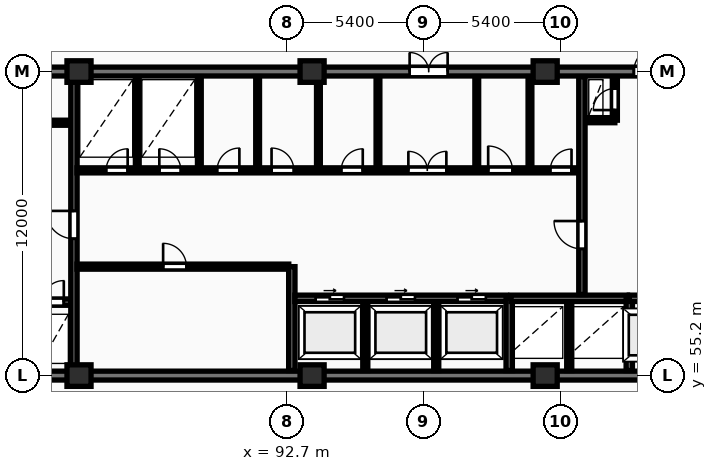
"""IFC4 building model, lengths in metres.
Left out: names, types, materials, properties, quantities, classifications, styles, units other than length and angle.
Written with IfcOpenShell. Run it as: python <this file> out.ifc"""

import sys

from ifc_helpers import new_model, si_unit, direction, frame, frame_2d, origin, origin_2d, place, context, subcontext, project, spatial, rectangle, extrude, element, fill, save


model = new_model("IFC4")
c1 = context("Model", 3, precision=1e-05, world=origin(), true_north=direction((0.0, 1.0)))
c2 = subcontext(c1, "Body", "Model", "MODEL_VIEW")
j1 = project(units=[si_unit("LENGTHUNIT", "METRE"), si_unit("PLANEANGLEUNIT", "RADIAN")], contexts=[c1])
p1 = place(None, origin())
s1 = spatial("IfcSite", under=j1, at=p1, CompositionType="ELEMENT")
p2 = place(p1, origin())
s2 = spatial("IfcBuilding", under=s1, at=p2, CompositionType="ELEMENT")
p3 = place(p2, frame((0.0, 0.0, 119.8)))
s3 = spatial("IfcBuildingStorey", under=s2, at=p3, CompositionType="ELEMENT", Elevation=119.8)
for number, where, z_axis, x_axis in (
    (1, (84.5, 55.2, 0.0), (0.0, 0.0, 1.0), (1.0, 0.0, 0.0)),
    (2, (84.5, 67.2, 0.0), (0.0, 0.0, 1.0), (1.0, 0.0, 0.0)),
    (3, (93.7, 55.2, 0.0), (0.0, 0.0, 1.0), (1.0, 0.0, 0.0)),
    (4, (93.7, 67.2, 0.0), (0.0, 0.0, 1.0), (1.0, 0.0, 0.0)),
    (5, (102.9, 55.2, 0.0), (0.0, 0.0, 1.0), (1.0, 0.0, 0.0)),
    (6, (102.9, 67.2, 0.0), (0.0, 0.0, 1.0), (1.0, 0.0, 0.0)),
):
    element("IfcColumn", number, at=place(p3, frame(where, z_axis=z_axis, x_axis=x_axis)), inside=s3, PredefinedType="COLUMN", context=c2, shape_type="SweptSolid", body=[
        extrude(rectangle(XDim=0.95, YDim=0.85, at=origin_2d()), origin(), (0.0, 0.0, 1.0), 3.25),
    ])
p4 = place(p3, frame((75.95, 55.2, 0.0), z_axis=(0.0, 0.0, 1.0), x_axis=(1.0, 0.0, 0.0)))
e7 = element("IfcWall", 7, at=p4, inside=s3, PredefinedType="SHEAR", context=c2, shape_type="SweptSolid", body=[
    extrude(rectangle(XDim=36.3, YDim=0.35, at=frame_2d((18.15, 0.0))), origin(), (0.0, 0.0, 1.0), 3.25),
])
p5 = place(p3, frame((75.95, 67.2, 0.0), z_axis=(0.0, 0.0, 1.0), x_axis=(1.0, 0.0, 0.0)))
e8 = element("IfcWall", 8, at=p5, inside=s3, PredefinedType="SHEAR", context=c2, shape_type="SweptSolid", body=[
    extrude(rectangle(XDim=36.3, YDim=0.35, at=frame_2d((18.15, 0.0))), origin(), (0.0, 0.0, 1.0), 3.25),
])
p6 = place(p5, frame((5.25, 0.0, 0.0)))
e9 = element("IfcOpeningElement", 9, at=p6, cuts=e8, PredefinedType="OPENING", context=c2, shape_type="SweptSolid", body=[
    extrude(rectangle(XDim=1.0, YDim=2.15, at=frame_2d((0.5, 1.075))), frame((0.0, 0.185, 0.0), z_axis=(0.0, -1.0, 0.0), x_axis=(1.0, 0.0, 0.0)), (0.0, 0.0, 1.0), 0.37),
])
p7 = place(p5, frame((21.6, 0.0, 0.0)))
e10 = element("IfcOpeningElement", 10, at=p7, cuts=e8, PredefinedType="OPENING", context=c2, shape_type="SweptSolid", body=[
    extrude(rectangle(XDim=1.5, YDim=2.2, at=frame_2d((0.75, 1.1))), frame((0.0, 0.185, 0.0), z_axis=(0.0, -1.0, 0.0), x_axis=(1.0, 0.0, 0.0)), (0.0, 0.0, 1.0), 0.37),
])
p8 = place(p5, frame((30.45, 0.0, 0.0)))
e11 = element("IfcOpeningElement", 11, at=p8, cuts=e8, PredefinedType="OPENING", context=c2, shape_type="SweptSolid", body=[
    extrude(rectangle(XDim=1.0, YDim=2.15, at=frame_2d((0.5, 1.075))), frame((0.0, 0.185, 0.0), z_axis=(0.0, -1.0, 0.0), x_axis=(1.0, 0.0, 0.0)), (0.0, 0.0, 1.0), 0.37),
])
p9 = place(p3, frame((79.79, 58.1, 0.0), z_axis=(0.0, 0.0, 1.0), x_axis=(1.0, 0.0, 0.0)))
e12 = element("IfcWall", 12, at=p9, inside=s3, PredefinedType="SHEAR", context=c2, shape_type="SweptSolid", body=[
    extrude(rectangle(XDim=4.39, YDim=0.25, at=frame_2d((2.195, 0.0))), origin(), (0.0, 0.0, 1.0), 3.25),
])
p10 = place(p9, frame((1.05, 0.0, 0.0)))
e13 = element("IfcOpeningElement", 13, at=p10, cuts=e12, PredefinedType="OPENING", context=c2, shape_type="SweptSolid", body=[
    extrude(rectangle(XDim=1.12, YDim=2.12, at=frame_2d((0.56, 1.06))), frame((0.0, 0.135, 0.0), z_axis=(0.0, -1.0, 0.0), x_axis=(1.0, 0.0, 0.0)), (0.0, 0.0, 1.0), 0.27),
])
p11 = place(p9, frame((3.26, 0.0, 0.0)))
e14 = element("IfcOpeningElement", 14, at=p11, cuts=e12, PredefinedType="OPENING", context=c2, shape_type="SweptSolid", body=[
    extrude(rectangle(XDim=0.85, YDim=2.05, at=frame_2d((0.425, 1.025))), frame((0.0, 0.135, 0.0), z_axis=(0.0, -1.0, 0.0), x_axis=(1.0, 0.0, 0.0)), (0.0, 0.0, 1.0), 0.27),
])
p12 = place(p3, frame((79.79, 65.18, 0.0), z_axis=(0.0, 0.0, 1.0), x_axis=(1.0, 0.0, 0.0)))
e15 = element("IfcWall", 15, at=p12, inside=s3, PredefinedType="PARTITIONING", context=c2, shape_type="SweptSolid", body=[
    extrude(rectangle(XDim=4.39, YDim=0.2, at=frame_2d((2.195, 0.0))), origin(), (0.0, 0.0, 1.0), 2.97),
])
p13 = place(p12, frame((1.5, 0.0, 0.0)))
e16 = element("IfcOpeningElement", 16, at=p13, cuts=e15, PredefinedType="OPENING", context=c2, shape_type="SweptSolid", body=[
    extrude(rectangle(XDim=1.1, YDim=2.1, at=frame_2d((0.55, 1.05))), frame((0.0, 0.11, 0.0), z_axis=(0.0, -1.0, 0.0), x_axis=(1.0, 0.0, 0.0)), (0.0, 0.0, 1.0), 0.22),
])
p14 = place(p3, frame((84.3, 55.4, 0.0), z_axis=(0.0, 0.0, 1.0), x_axis=(0.0, 1.0, 0.0)))
e17 = element("IfcWall", 17, at=p14, inside=s3, PredefinedType="SHEAR", context=c2, shape_type="SweptSolid", body=[
    extrude(rectangle(XDim=11.6, YDim=0.25, at=frame_2d((5.8, 0.0))), origin(), (0.0, 0.0, 1.0), 3.25),
])
p15 = place(p14, frame((5.2, 0.0, 0.0)))
e18 = element("IfcOpeningElement", 18, at=p15, cuts=e17, PredefinedType="OPENING", context=c2, shape_type="SweptSolid", body=[
    extrude(rectangle(XDim=1.1, YDim=2.1, at=frame_2d((0.55, 1.05))), frame((0.0, 0.135, 0.0), z_axis=(0.0, -1.0, 0.0), x_axis=(1.0, 0.0, 0.0)), (0.0, 0.0, 1.0), 0.27),
])
p16 = place(p3, frame((84.42, 59.5, 0.0), z_axis=(0.0, 0.0, 1.0), x_axis=(1.0, 0.0, 0.0)))
e19 = element("IfcWall", 19, at=p16, inside=s3, PredefinedType="PARTITIONING", context=c2, shape_type="SweptSolid", body=[
    extrude(rectangle(XDim=8.36, YDim=0.2, at=frame_2d((4.18, 0.0))), origin(), (0.0, 0.0, 1.0), 2.97),
])
p17 = place(p16, frame((3.4, 0.0, 0.0)))
e20 = element("IfcOpeningElement", 20, at=p17, cuts=e19, PredefinedType="OPENING", context=c2, shape_type="SweptSolid", body=[
    extrude(rectangle(XDim=0.92, YDim=2.08, at=frame_2d((0.46, 1.04))), frame((0.0, 0.11, 0.0), z_axis=(0.0, -1.0, 0.0), x_axis=(1.0, 0.0, 0.0)), (0.0, 0.0, 1.0), 0.22),
])
p18 = place(p3, frame((92.9, 55.4, 0.0), z_axis=(0.0, 0.0, 1.0), x_axis=(0.0, 1.0, 0.0)))
e21 = element("IfcWall", 21, at=p18, inside=s3, PredefinedType="SHEAR", context=c2, shape_type="SweptSolid", body=[
    extrude(rectangle(XDim=4.1, YDim=0.25, at=frame_2d((2.05, 0.0))), origin(), (0.0, 0.0, 1.0), 3.25),
])
for number, where, z_axis, x_axis in (
    (22, (95.8, 55.4, 0.0), (0.0, 0.0, 1.0), (0.0, 1.0, 0.0)),
    (23, (98.6, 55.4, 0.0), (0.0, 0.0, 1.0), (0.0, 1.0, 0.0)),
):
    element("IfcWall", number, at=place(p3, frame(where, z_axis=z_axis, x_axis=x_axis)), inside=s3, PredefinedType="PARTITIONING", context=c2, shape_type="SweptSolid", body=[
        extrude(rectangle(XDim=2.72, YDim=0.2, at=frame_2d((1.36, 0.0))), origin(), (0.0, 0.0, 1.0), 2.97),
    ])
p19 = place(p3, frame((93.02, 58.25, 0.0), z_axis=(0.0, 0.0, 1.0), x_axis=(1.0, 0.0, 0.0)))
e24 = element("IfcWall", 24, at=p19, inside=s3, PredefinedType="SHEAR", context=c2, shape_type="SweptSolid", body=[
    extrude(rectangle(XDim=8.36, YDim=0.25, at=frame_2d((4.18, 0.0))), origin(), (0.0, 0.0, 1.0), 3.25),
])
p20 = place(p19, frame((0.82, 0.0, 0.0)))
e25 = element("IfcOpeningElement", 25, at=p20, cuts=e24, PredefinedType="OPENING", context=c2, shape_type="SweptSolid", body=[
    extrude(rectangle(XDim=1.12, YDim=2.12, at=frame_2d((0.56, 1.06))), frame((0.0, 0.135, 0.0), z_axis=(0.0, -1.0, 0.0), x_axis=(1.0, 0.0, 0.0)), (0.0, 0.0, 1.0), 0.27),
])
p21 = place(p19, frame((3.62, 0.0, 0.0)))
e26 = element("IfcOpeningElement", 26, at=p21, cuts=e24, PredefinedType="OPENING", context=c2, shape_type="SweptSolid", body=[
    extrude(rectangle(XDim=1.12, YDim=2.12, at=frame_2d((0.56, 1.06))), frame((0.0, 0.135, 0.0), z_axis=(0.0, -1.0, 0.0), x_axis=(1.0, 0.0, 0.0)), (0.0, 0.0, 1.0), 0.27),
])
p22 = place(p19, frame((6.42, 0.0, 0.0)))
e27 = element("IfcOpeningElement", 27, at=p22, cuts=e24, PredefinedType="OPENING", context=c2, shape_type="SweptSolid", body=[
    extrude(rectangle(XDim=1.12, YDim=2.12, at=frame_2d((0.56, 1.06))), frame((0.0, 0.135, 0.0), z_axis=(0.0, -1.0, 0.0), x_axis=(1.0, 0.0, 0.0)), (0.0, 0.0, 1.0), 0.27),
])
p23 = place(p3, frame((101.48, 55.4, 0.0), z_axis=(0.0, 0.0, 1.0), x_axis=(0.0, 1.0, 0.0)))
e28 = element("IfcWall", 28, at=p23, inside=s3, PredefinedType="SHEAR", context=c2, shape_type="SweptSolid", body=[
    extrude(rectangle(XDim=2.85, YDim=0.25, at=frame_2d((1.425, 0.0))), origin(), (0.0, 0.0, 1.0), 3.25),
])
p24 = place(p3, frame((103.85, 55.4, 0.0), z_axis=(0.0, 0.0, 1.0), x_axis=(0.0, 1.0, 0.0)))
e29 = element("IfcWall", 29, at=p24, inside=s3, PredefinedType="PARTITIONING", context=c2, shape_type="SweptSolid", body=[
    extrude(rectangle(XDim=2.72, YDim=0.2, at=frame_2d((1.36, 0.0))), origin(), (0.0, 0.0, 1.0), 2.97),
])
p25 = place(p3, frame((101.55, 58.25, 0.0), z_axis=(0.0, 0.0, 1.0), x_axis=(1.0, 0.0, 0.0)))
e30 = element("IfcWall", 30, at=p25, inside=s3, PredefinedType="SHEAR", context=c2, shape_type="SweptSolid", body=[
    extrude(rectangle(XDim=4.6, YDim=0.25, at=frame_2d((2.3, 0.0))), origin(), (0.0, 0.0, 1.0), 3.25),
])
p26 = place(p3, frame((106.22, 55.4, 0.0), z_axis=(0.0, 0.0, 1.0), x_axis=(0.0, 1.0, 0.0)))
e31 = element("IfcWall", 31, at=p26, inside=s3, PredefinedType="SHEAR", context=c2, shape_type="SweptSolid", body=[
    extrude(rectangle(XDim=2.85, YDim=0.25, at=frame_2d((1.425, 0.0))), origin(), (0.0, 0.0, 1.0), 3.25),
])
p27 = place(p3, frame((106.22, 58.25, 0.0), z_axis=(0.0, 0.0, 1.0), x_axis=(1.0, 0.0, 0.0)))
e32 = element("IfcWall", 32, at=p27, inside=s3, PredefinedType="SHEAR", context=c2, shape_type="SweptSolid", body=[
    extrude(rectangle(XDim=2.46, YDim=0.25, at=frame_2d((1.23, 0.0))), origin(), (0.0, 0.0, 1.0), 3.25),
])
p28 = place(p27, frame((0.67, 0.0, 0.0)))
e33 = element("IfcOpeningElement", 33, at=p28, cuts=e32, PredefinedType="OPENING", context=c2, shape_type="SweptSolid", body=[
    extrude(rectangle(XDim=1.12, YDim=2.12, at=frame_2d((0.56, 1.06))), frame((0.0, 0.135, 0.0), z_axis=(0.0, -1.0, 0.0), x_axis=(1.0, 0.0, 0.0)), (0.0, 0.0, 1.0), 0.27),
])
for number, where, z_axis, x_axis in (
    (34, (86.8, 63.4, 0.0), (0.0, 0.0, 1.0), (0.0, 1.0, 0.0)),
    (35, (89.25, 63.4, 0.0), (0.0, 0.0, 1.0), (0.0, 1.0, 0.0)),
    (36, (91.55, 63.4, 0.0), (0.0, 0.0, 1.0), (0.0, 1.0, 0.0)),
):
    element("IfcWall", number, at=place(p3, frame(where, z_axis=z_axis, x_axis=x_axis)), inside=s3, PredefinedType="PARTITIONING", context=c2, shape_type="SweptSolid", body=[
        extrude(rectangle(XDim=3.6, YDim=0.15, at=frame_2d((1.8, 0.0))), origin(), (0.0, 0.0, 1.0), 2.97),
    ])
p29 = place(p3, frame((93.95, 63.4, 0.0), z_axis=(0.0, 0.0, 1.0), x_axis=(0.0, 1.0, 0.0)))
e37 = element("IfcWall", 37, at=p29, inside=s3, PredefinedType="PARTITIONING", context=c2, shape_type="SweptSolid", body=[
    extrude(rectangle(XDim=3.6, YDim=0.15, at=frame_2d((1.8, 0.0))), origin(), (0.0, 0.0, 1.0), 2.277),
])
for number, where, z_axis, x_axis in (
    (38, (102.3, 63.4, 0.0), (0.0, 0.0, 1.0), (0.0, 1.0, 0.0)),
    (39, (96.3, 63.4, 0.0), (0.0, 0.0, 1.0), (0.0, 1.0, 0.0)),
    (40, (100.2, 63.4, 0.0), (0.0, 0.0, 1.0), (0.0, 1.0, 0.0)),
):
    element("IfcWall", number, at=place(p3, frame(where, z_axis=z_axis, x_axis=x_axis)), inside=s3, PredefinedType="PARTITIONING", context=c2, shape_type="SweptSolid", body=[
        extrude(rectangle(XDim=3.6, YDim=0.15, at=frame_2d((1.8, 0.0))), origin(), (0.0, 0.0, 1.0), 2.97),
    ])
p30 = place(p3, frame((84.42, 63.3, 0.0), z_axis=(0.0, 0.0, 1.0), x_axis=(1.0, 0.0, 0.0)))
e41 = element("IfcWall", 41, at=p30, inside=s3, PredefinedType="PARTITIONING", context=c2, shape_type="SweptSolid", body=[
    extrude(rectangle(XDim=19.83, YDim=0.2, at=frame_2d((9.915, 0.0))), origin(), (0.0, 0.0, 1.0), 2.97),
])
p31 = place(p30, frame((1.15, 0.0, 0.0)))
e42 = element("IfcOpeningElement", 42, at=p31, cuts=e41, PredefinedType="OPENING", context=c2, shape_type="SweptSolid", body=[
    extrude(rectangle(XDim=0.85, YDim=2.05, at=frame_2d((0.425, 1.025))), frame((0.0, 0.11, 0.0), z_axis=(0.0, -1.0, 0.0), x_axis=(1.0, 0.0, 0.0)), (0.0, 0.0, 1.0), 0.22),
])
p32 = place(p30, frame((3.25, 0.0, 0.0)))
e43 = element("IfcOpeningElement", 43, at=p32, cuts=e41, PredefinedType="OPENING", context=c2, shape_type="SweptSolid", body=[
    extrude(rectangle(XDim=0.85, YDim=2.05, at=frame_2d((0.425, 1.025))), frame((0.0, 0.11, 0.0), z_axis=(0.0, -1.0, 0.0), x_axis=(1.0, 0.0, 0.0)), (0.0, 0.0, 1.0), 0.22),
])
p33 = place(p30, frame((13.08, 0.0, 0.0)))
e44 = element("IfcOpeningElement", 44, at=p33, cuts=e41, PredefinedType="OPENING", context=c2, shape_type="SweptSolid", body=[
    extrude(rectangle(XDim=1.5, YDim=2.2, at=frame_2d((0.75, 1.1))), frame((0.0, 0.11, 0.0), z_axis=(0.0, -1.0, 0.0), x_axis=(1.0, 0.0, 0.0)), (0.0, 0.0, 1.0), 0.22),
])
p34 = place(p30, frame((5.53, 0.0, 0.0)))
e45 = element("IfcOpeningElement", 45, at=p34, cuts=e41, PredefinedType="OPENING", context=c2, shape_type="SweptSolid", body=[
    extrude(rectangle(XDim=0.88, YDim=2.06, at=frame_2d((0.44, 1.03))), frame((0.0, 0.11, 0.0), z_axis=(0.0, -1.0, 0.0), x_axis=(1.0, 0.0, 0.0)), (0.0, 0.0, 1.0), 0.22),
])
p35 = place(p30, frame((7.68, 0.0, 0.0)))
e46 = element("IfcOpeningElement", 46, at=p35, cuts=e41, PredefinedType="OPENING", context=c2, shape_type="SweptSolid", body=[
    extrude(rectangle(XDim=0.88, YDim=2.06, at=frame_2d((0.44, 1.03))), frame((0.0, 0.11, 0.0), z_axis=(0.0, -1.0, 0.0), x_axis=(1.0, 0.0, 0.0)), (0.0, 0.0, 1.0), 0.22),
])
p36 = place(p30, frame((10.43, 0.0, 0.0)))
e47 = element("IfcOpeningElement", 47, at=p36, cuts=e41, PredefinedType="OPENING", context=c2, shape_type="SweptSolid", body=[
    extrude(rectangle(XDim=0.85, YDim=2.05, at=frame_2d((0.425, 1.025))), frame((0.0, 0.11, 0.0), z_axis=(0.0, -1.0, 0.0), x_axis=(1.0, 0.0, 0.0)), (0.0, 0.0, 1.0), 0.22),
])
p37 = place(p30, frame((16.23, 0.0, 0.0)))
e48 = element("IfcOpeningElement", 48, at=p37, cuts=e41, PredefinedType="OPENING", context=c2, shape_type="SweptSolid", body=[
    extrude(rectangle(XDim=0.96, YDim=2.1, at=frame_2d((0.48, 1.05))), frame((0.0, 0.11, 0.0), z_axis=(0.0, -1.0, 0.0), x_axis=(1.0, 0.0, 0.0)), (0.0, 0.0, 1.0), 0.22),
])
p38 = place(p30, frame((18.68, 0.0, 0.0)))
e49 = element("IfcOpeningElement", 49, at=p38, cuts=e41, PredefinedType="OPENING", context=c2, shape_type="SweptSolid", body=[
    extrude(rectangle(XDim=0.84, YDim=2.04, at=frame_2d((0.42, 1.02))), frame((0.0, 0.11, 0.0), z_axis=(0.0, -1.0, 0.0), x_axis=(1.0, 0.0, 0.0)), (0.0, 0.0, 1.0), 0.22),
])
p39 = place(p3, frame((104.45, 65.28, 0.0), z_axis=(0.0, 0.0, 1.0), x_axis=(1.0, 0.0, 0.0)))
e50 = element("IfcWall", 50, at=p39, inside=s3, PredefinedType="PARTITIONING", context=c2, shape_type="SweptSolid", body=[
    extrude(rectangle(XDim=1.2, YDim=0.2, at=frame_2d((0.6, 0.0))), origin(), (0.0, 0.0, 1.0), 2.97),
])
p40 = place(p3, frame((105.65, 65.28, 0.0), z_axis=(0.0, 0.0, 1.0), x_axis=(0.0, 1.0, 0.0)))
e51 = element("IfcWall", 51, at=p40, inside=s3, PredefinedType="PARTITIONING", context=c2, shape_type="SweptSolid", body=[
    extrude(rectangle(XDim=1.72, YDim=0.2, at=frame_2d((0.86, 0.0))), origin(), (0.0, 0.0, 1.0), 2.97),
])
p41 = place(p40, frame((0.4, 0.0, 0.0)))
e52 = element("IfcOpeningElement", 52, at=p41, cuts=e51, PredefinedType="OPENING", context=c2, shape_type="SweptSolid", body=[
    extrude(rectangle(XDim=0.85, YDim=2.05, at=frame_2d((0.425, 1.025))), frame((0.0, 0.11, 0.0), z_axis=(0.0, -1.0, 0.0), x_axis=(1.0, 0.0, 0.0)), (0.0, 0.0, 1.0), 0.22),
])
p42 = place(p3, frame((104.35, 58.4, 0.0), z_axis=(0.0, 0.0, 1.0), x_axis=(0.0, 1.0, 0.0)))
e53 = element("IfcWall", 53, at=p42, inside=s3, PredefinedType="SHEAR", context=c2, shape_type="SweptSolid", body=[
    extrude(rectangle(XDim=8.6, YDim=0.25, at=frame_2d((4.3, 0.0))), origin(), (0.0, 0.0, 1.0), 3.25),
])
p43 = place(p42, frame((1.8, 0.0, 0.0)))
e54 = element("IfcOpeningElement", 54, at=p43, cuts=e53, PredefinedType="OPENING", context=c2, shape_type="SweptSolid", body=[
    extrude(rectangle(XDim=1.1, YDim=2.1, at=frame_2d((0.55, 1.05))), frame((0.0, 0.135, 0.0), z_axis=(0.0, -1.0, 0.0), x_axis=(1.0, 0.0, 0.0)), (0.0, 0.0, 1.0), 0.27),
])
p44 = place(p7, origin())
e55 = element("IfcDoor", 55, at=p44, inside=s3, OperationType="DOUBLE_DOOR_SINGLE_SWING", PredefinedType="DOOR", context=c2, shape_type="SweptSolid", body=[
    extrude(rectangle(XDim=1.5, YDim=2.2, at=frame_2d((0.75, 1.1))), frame((0.0, 0.025, 0.0), z_axis=(0.0, -1.0, 0.0), x_axis=(1.0, 0.0, 0.0)), (0.0, 0.0, 1.0), 0.05),
])
fill(e10, e55)
p45 = place(p8, origin())
e56 = element("IfcDoor", 56, at=p45, inside=s3, OperationType="SINGLE_SWING_RIGHT", PredefinedType="DOOR", context=c2, shape_type="SweptSolid", body=[
    extrude(rectangle(XDim=1.0, YDim=2.15, at=frame_2d((0.5, 1.075))), frame((0.0, 0.025, 0.0), z_axis=(0.0, -1.0, 0.0), x_axis=(1.0, 0.0, 0.0)), (0.0, 0.0, 1.0), 0.05),
])
fill(e11, e56)
p46 = place(p11, origin())
e57 = element("IfcDoor", 57, at=p46, inside=s3, OperationType="SINGLE_SWING_RIGHT", PredefinedType="DOOR", context=c2, shape_type="SweptSolid", body=[
    extrude(rectangle(XDim=0.85, YDim=2.05, at=frame_2d((0.425, 1.025))), frame((0.0, 0.025, 0.0), z_axis=(0.0, -1.0, 0.0), x_axis=(1.0, 0.0, 0.0)), (0.0, 0.0, 1.0), 0.05),
])
fill(e14, e57)
p47 = place(p15, origin())
e58 = element("IfcDoor", 58, at=p47, inside=s3, OperationType="SINGLE_SWING_RIGHT", PredefinedType="DOOR", context=c2, shape_type="SweptSolid", body=[
    extrude(rectangle(XDim=1.1, YDim=2.1, at=frame_2d((0.55, 1.05))), frame((0.0, 0.025, 0.0), z_axis=(0.0, -1.0, 0.0), x_axis=(1.0, 0.0, 0.0)), (0.0, 0.0, 1.0), 0.05),
])
fill(e18, e58)
p48 = place(p17, origin())
e59 = element("IfcDoor", 59, at=p48, inside=s3, OperationType="SINGLE_SWING_LEFT", PredefinedType="DOOR", context=c2, shape_type="SweptSolid", body=[
    extrude(rectangle(XDim=0.92, YDim=2.08, at=frame_2d((0.46, 1.04))), frame((0.0, 0.025, 0.0), z_axis=(0.0, -1.0, 0.0), x_axis=(1.0, 0.0, 0.0)), (0.0, 0.0, 1.0), 0.05),
])
fill(e20, e59)
p49 = place(p20, origin())
e60 = element("IfcDoor", 60, at=p49, inside=s3, OperationType="SLIDING_TO_RIGHT", PredefinedType="DOOR", context=c2, shape_type="SweptSolid", body=[
    extrude(rectangle(XDim=1.12, YDim=2.12, at=frame_2d((0.56, 1.06))), frame((0.0, 0.025, 0.0), z_axis=(0.0, -1.0, 0.0), x_axis=(1.0, 0.0, 0.0)), (0.0, 0.0, 1.0), 0.05),
])
fill(e25, e60)
p50 = place(p21, origin())
e61 = element("IfcDoor", 61, at=p50, inside=s3, OperationType="SLIDING_TO_RIGHT", PredefinedType="DOOR", context=c2, shape_type="SweptSolid", body=[
    extrude(rectangle(XDim=1.12, YDim=2.12, at=frame_2d((0.56, 1.06))), frame((0.0, 0.025, 0.0), z_axis=(0.0, -1.0, 0.0), x_axis=(1.0, 0.0, 0.0)), (0.0, 0.0, 1.0), 0.05),
])
fill(e26, e61)
p51 = place(p22, origin())
e62 = element("IfcDoor", 62, at=p51, inside=s3, OperationType="SLIDING_TO_RIGHT", PredefinedType="DOOR", context=c2, shape_type="SweptSolid", body=[
    extrude(rectangle(XDim=1.12, YDim=2.12, at=frame_2d((0.56, 1.06))), frame((0.0, 0.025, 0.0), z_axis=(0.0, -1.0, 0.0), x_axis=(1.0, 0.0, 0.0)), (0.0, 0.0, 1.0), 0.05),
])
fill(e27, e62)
p52 = place(p31, origin())
e63 = element("IfcDoor", 63, at=p52, inside=s3, OperationType="SINGLE_SWING_RIGHT", PredefinedType="DOOR", context=c2, shape_type="SweptSolid", body=[
    extrude(rectangle(XDim=0.85, YDim=2.05, at=frame_2d((0.425, 1.025))), frame((0.0, 0.025, 0.0), z_axis=(0.0, -1.0, 0.0), x_axis=(1.0, 0.0, 0.0)), (0.0, 0.0, 1.0), 0.05),
])
fill(e42, e63)
p53 = place(p32, origin())
e64 = element("IfcDoor", 64, at=p53, inside=s3, OperationType="SINGLE_SWING_LEFT", PredefinedType="DOOR", context=c2, shape_type="SweptSolid", body=[
    extrude(rectangle(XDim=0.85, YDim=2.05, at=frame_2d((0.425, 1.025))), frame((0.0, 0.025, 0.0), z_axis=(0.0, -1.0, 0.0), x_axis=(1.0, 0.0, 0.0)), (0.0, 0.0, 1.0), 0.05),
])
fill(e43, e64)
p54 = place(p33, origin())
e65 = element("IfcDoor", 65, at=p54, inside=s3, OperationType="DOUBLE_DOOR_SINGLE_SWING", PredefinedType="DOOR", context=c2, shape_type="SweptSolid", body=[
    extrude(rectangle(XDim=1.5, YDim=2.2, at=frame_2d((0.75, 1.1))), frame((0.0, 0.025, 0.0), z_axis=(0.0, -1.0, 0.0), x_axis=(1.0, 0.0, 0.0)), (0.0, 0.0, 1.0), 0.05),
])
fill(e44, e65)
p55 = place(p34, origin())
e66 = element("IfcDoor", 66, at=p55, inside=s3, OperationType="SINGLE_SWING_RIGHT", PredefinedType="DOOR", context=c2, shape_type="SweptSolid", body=[
    extrude(rectangle(XDim=0.88, YDim=2.06, at=frame_2d((0.44, 1.03))), frame((0.0, 0.025, 0.0), z_axis=(0.0, -1.0, 0.0), x_axis=(1.0, 0.0, 0.0)), (0.0, 0.0, 1.0), 0.05),
])
fill(e45, e66)
p56 = place(p35, origin())
e67 = element("IfcDoor", 67, at=p56, inside=s3, OperationType="SINGLE_SWING_LEFT", PredefinedType="DOOR", context=c2, shape_type="SweptSolid", body=[
    extrude(rectangle(XDim=0.88, YDim=2.06, at=frame_2d((0.44, 1.03))), frame((0.0, 0.025, 0.0), z_axis=(0.0, -1.0, 0.0), x_axis=(1.0, 0.0, 0.0)), (0.0, 0.0, 1.0), 0.05),
])
fill(e46, e67)
p57 = place(p36, origin())
e68 = element("IfcDoor", 68, at=p57, inside=s3, OperationType="SINGLE_SWING_RIGHT", PredefinedType="DOOR", context=c2, shape_type="SweptSolid", body=[
    extrude(rectangle(XDim=0.85, YDim=2.05, at=frame_2d((0.425, 1.025))), frame((0.0, 0.025, 0.0), z_axis=(0.0, -1.0, 0.0), x_axis=(1.0, 0.0, 0.0)), (0.0, 0.0, 1.0), 0.05),
])
fill(e47, e68)
p58 = place(p37, origin())
e69 = element("IfcDoor", 69, at=p58, inside=s3, OperationType="SINGLE_SWING_LEFT", PredefinedType="DOOR", context=c2, shape_type="SweptSolid", body=[
    extrude(rectangle(XDim=0.96, YDim=2.1, at=frame_2d((0.48, 1.05))), frame((0.0, 0.025, 0.0), z_axis=(0.0, -1.0, 0.0), x_axis=(1.0, 0.0, 0.0)), (0.0, 0.0, 1.0), 0.05),
])
fill(e48, e69)
p59 = place(p38, origin())
e70 = element("IfcDoor", 70, at=p59, inside=s3, OperationType="SINGLE_SWING_RIGHT", PredefinedType="DOOR", context=c2, shape_type="SweptSolid", body=[
    extrude(rectangle(XDim=0.84, YDim=2.04, at=frame_2d((0.42, 1.02))), frame((0.0, 0.025, 0.0), z_axis=(0.0, -1.0, 0.0), x_axis=(1.0, 0.0, 0.0)), (0.0, 0.0, 1.0), 0.05),
])
fill(e49, e70)
p60 = place(p41, origin())
e71 = element("IfcDoor", 71, at=p60, inside=s3, OperationType="SINGLE_SWING_LEFT", PredefinedType="DOOR", context=c2, shape_type="SweptSolid", body=[
    extrude(rectangle(XDim=0.85, YDim=2.05, at=frame_2d((0.425, 1.025))), frame((0.0, 0.025, 0.0), z_axis=(0.0, -1.0, 0.0), x_axis=(1.0, 0.0, 0.0)), (0.0, 0.0, 1.0), 0.05),
])
fill(e52, e71)
p61 = place(p43, origin())
e72 = element("IfcDoor", 72, at=p61, inside=s3, OperationType="SINGLE_SWING_RIGHT", PredefinedType="DOOR", context=c2, shape_type="SweptSolid", body=[
    extrude(rectangle(XDim=1.1, YDim=2.1, at=frame_2d((0.55, 1.05))), frame((0.0, 0.025, 0.0), z_axis=(0.0, -1.0, 0.0), x_axis=(1.0, 0.0, 0.0)), (0.0, 0.0, 1.0), 0.05),
])
fill(e54, e72)
save(model, sys.argv[1])
